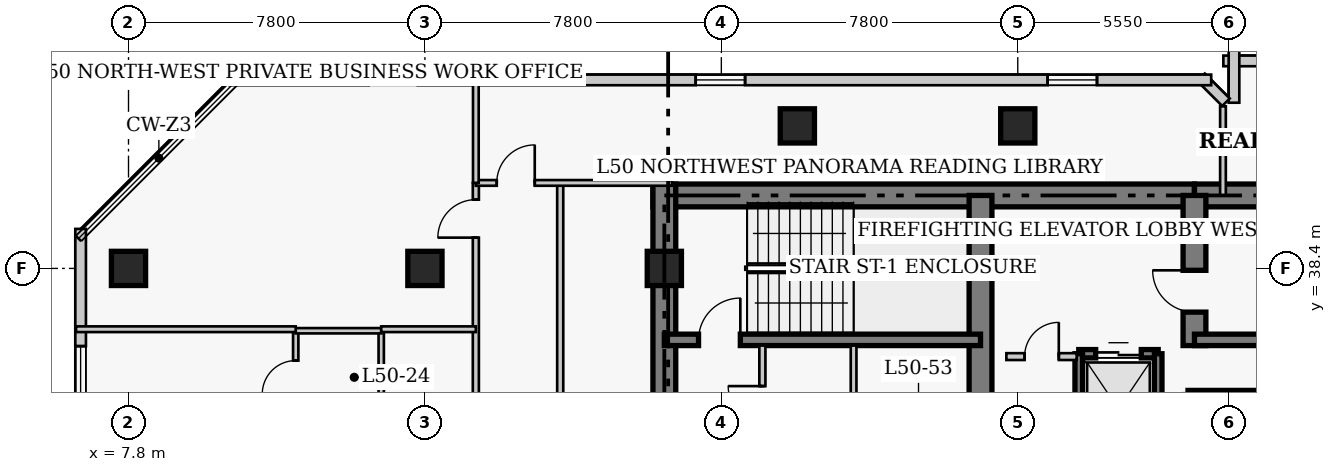
"""IFC4 building model, lengths in metres.
Left out: names, types, materials, properties, quantities, classifications, styles, units other than length and angle.
Written with IfcOpenShell. Run it as: python <this file> out.ifc"""

import sys

from ifc_helpers import new_model, si_unit, direction, frame, frame_2d, origin, origin_2d, place, context, subcontext, project, spatial, rectangle, extrude, element, fill, save


model = new_model("IFC4")
c1 = context("Model", 3, precision=1e-05, world=origin(), true_north=direction((0.0, 1.0)))
c2 = subcontext(c1, "Body", "Model", "MODEL_VIEW")
j1 = project(units=[si_unit("LENGTHUNIT", "METRE"), si_unit("PLANEANGLEUNIT", "RADIAN")], contexts=[c1])
p1 = place(None, origin())
s1 = spatial("IfcSite", under=j1, at=p1, CompositionType="ELEMENT")
p2 = place(p1, origin())
s2 = spatial("IfcBuilding", under=s1, at=p2, CompositionType="ELEMENT")
p3 = place(p2, frame((0.0, 0.0, 200.7)))
s3 = spatial("IfcBuildingStorey", under=s2, at=p3, CompositionType="ELEMENT", Elevation=200.7)
p4 = place(p3, frame((21.6, 40.32, 0.0), z_axis=(0.0, 0.0, 1.0), x_axis=(1.0, 0.0, 0.0)))
e1 = element("IfcWall", 1, at=p4, inside=s3, PredefinedType="SHEAR", context=c2, shape_type="SweptSolid", body=[
    extrude(rectangle(XDim=14.25, YDim=0.6, at=frame_2d((7.125, 0.0))), origin(), (0.0, 0.0, 1.0), 3.9),
])
p5 = place(p3, frame((35.85, 40.32, 0.0), z_axis=(0.0, 0.0, 1.0), x_axis=(1.0, 0.0, 0.0)))
e2 = element("IfcWall", 2, at=p5, inside=s3, PredefinedType="SHEAR", context=c2, shape_type="SweptSolid", body=[
    extrude(rectangle(XDim=12.6, YDim=0.6, at=frame_2d((6.3, 0.0))), origin(), (0.0, 0.0, 1.0), 3.9),
])
p6 = place(p3, frame((21.9, 27.05, 0.0), z_axis=(0.0, 0.0, 1.0), x_axis=(0.0, 1.0, 0.0)))
e3 = element("IfcWall", 3, at=p6, inside=s3, PredefinedType="SHEAR", context=c2, shape_type="SweptSolid", body=[
    extrude(rectangle(XDim=13.57, YDim=0.6, at=frame_2d((6.785, 0.0))), origin(), (0.0, 0.0, 1.0), 3.9),
])
p7 = place(p3, frame((30.22, 33.05, 0.0), z_axis=(0.0, 0.0, 1.0), x_axis=(0.0, 1.0, 0.0)))
e4 = element("IfcWall", 4, at=p7, inside=s3, PredefinedType="SHEAR", context=c2, shape_type="SweptSolid", body=[
    extrude(rectangle(XDim=7.27, YDim=0.6, at=frame_2d((3.635, 0.0))), origin(), (0.0, 0.0, 1.0), 3.9),
])
p8 = place(p3, frame((35.85, 36.37, 0.0), z_axis=(0.0, 0.0, 1.0), x_axis=(0.0, 1.0, 0.0)))
e5 = element("IfcWall", 5, at=p8, inside=s3, PredefinedType="SHEAR", context=c2, shape_type="SweptSolid", body=[
    extrude(rectangle(XDim=3.95, YDim=0.6, at=frame_2d((1.975, 0.0))), origin(), (0.0, 0.0, 1.0), 3.9),
])
p9 = place(p8, frame((0.88, 0.0, 0.0)))
e6 = element("IfcOpeningElement", 6, at=p9, cuts=e5, PredefinedType="OPENING", context=c2, shape_type="SweptSolid", body=[
    extrude(rectangle(XDim=1.1, YDim=2.15, at=frame_2d((0.55, 1.075))), frame((0.0, 0.31, 0.0), z_axis=(0.0, -1.0, 0.0), x_axis=(1.0, 0.0, 0.0)), (0.0, 0.0, 1.0), 0.62),
])
p10 = place(p3, frame((21.9, 36.52, 0.0), z_axis=(0.0, 0.0, 1.0), x_axis=(1.0, 0.0, 0.0)))
e7 = element("IfcWall", 7, at=p10, inside=s3, PredefinedType="SHEAR", context=c2, shape_type="SweptSolid", body=[
    extrude(rectangle(XDim=8.32, YDim=0.3, at=frame_2d((4.16, 0.0))), origin(), (0.0, 0.0, 1.0), 3.9),
])
p11 = place(p10, frame((0.9, 0.0, 0.0)))
e8 = element("IfcOpeningElement", 8, at=p11, cuts=e7, PredefinedType="OPENING", context=c2, shape_type="SweptSolid", body=[
    extrude(rectangle(XDim=1.1, YDim=2.15, at=frame_2d((0.55, 1.075))), frame((0.0, 0.16, 0.0), z_axis=(0.0, -1.0, 0.0), x_axis=(1.0, 0.0, 0.0)), (0.0, 0.0, 1.0), 0.32),
])
p12 = place(p3, frame((35.85, 36.52, 0.0), z_axis=(0.0, 0.0, 1.0), x_axis=(1.0, 0.0, 0.0)))
e9 = element("IfcWall", 9, at=p12, inside=s3, PredefinedType="SHEAR", context=c2, shape_type="SweptSolid", body=[
    extrude(rectangle(XDim=8.33, YDim=0.3, at=frame_2d((4.165, 0.0))), origin(), (0.0, 0.0, 1.0), 3.9),
])
for number, where, z_axis, x_axis in (
    (10, (7.8, 38.4, 0.0), (0.0, 0.0, 1.0), (1.0, 0.0, 0.0)),
    (11, (15.6, 38.4, 0.0), (0.0, 0.0, 1.0), (1.0, 0.0, 0.0)),
    (12, (21.9, 38.4, 0.0), (0.0, 0.0, 1.0), (1.0, 0.0, 0.0)),
    (13, (25.4, 42.15, 0.0), (0.0, 0.0, 1.0), (1.0, 0.0, 0.0)),
    (14, (31.2, 42.15, 0.0), (0.0, 0.0, 1.0), (1.0, 0.0, 0.0)),
):
    element("IfcColumn", number, at=place(p3, frame(where, z_axis=z_axis, x_axis=x_axis)), inside=s3, PredefinedType="COLUMN", context=c2, shape_type="SweptSolid", body=[
        extrude(rectangle(XDim=0.9, YDim=0.9, at=origin_2d()), origin(), (0.0, 0.0, 1.0), 3.9),
    ])
p13 = place(p3, frame((41.39, 43.86, 0.0), z_axis=(0.0, 0.0, 1.0), x_axis=(-1.0, 0.0, 0.0)))
e15 = element("IfcWall", 15, at=p13, inside=s3, PredefinedType="SOLIDWALL", context=c2, shape_type="SweptSolid", body=[
    extrude(rectangle(XDim=4.78, YDim=0.28, at=frame_2d((2.39, 0.0))), origin(), (0.0, 0.0, 1.0), 3.65),
])
p14 = place(p13, frame((1.74, 0.0, 0.85)))
e16 = element("IfcOpeningElement", 16, at=p14, cuts=e15, PredefinedType="OPENING", context=c2, shape_type="SweptSolid", body=[
    extrude(rectangle(XDim=1.3, YDim=1.7, at=frame_2d((0.65, 0.85))), frame((0.0, 0.15, 0.0), z_axis=(0.0, -1.0, 0.0), x_axis=(1.0, 0.0, 0.0)), (0.0, 0.0, 1.0), 0.3),
])
p15 = place(p3, frame((36.89, 44.14, 0.0), z_axis=(0.0, 0.0, 1.0), x_axis=(0.0, -1.0, 0.0)))
e17 = element("IfcWall", 17, at=p15, inside=s3, PredefinedType="SOLIDWALL", context=c2, shape_type="SweptSolid", body=[
    extrude(rectangle(XDim=1.38, YDim=0.28, at=frame_2d((0.69, 0.0))), origin(), (0.0, 0.0, 1.0), 3.65),
])
p16 = place(p3, frame((36.679, 42.773, 0.0), z_axis=(0.0, 0.0, 1.0), x_axis=(-0.707106781187, 0.707106781187, 0.0)))
e18 = element("IfcWall", 18, at=p16, inside=s3, PredefinedType="SOLIDWALL", context=c2, shape_type="SweptSolid", body=[
    extrude(rectangle(XDim=0.928, YDim=0.28, at=frame_2d((0.464, 0.0))), origin(), (0.0, 0.0, 1.0), 3.65),
])
p17 = place(p3, frame((36.29, 43.36, 0.0), z_axis=(0.0, 0.0, 1.0), x_axis=(-1.0, 0.0, 0.0)))
e19 = element("IfcWall", 19, at=p17, inside=s3, PredefinedType="SOLIDWALL", context=c2, shape_type="SweptSolid", body=[
    extrude(rectangle(XDim=25.83, YDim=0.28, at=frame_2d((12.915, 0.0))), origin(), (0.0, 0.0, 1.0), 3.65),
])
p18 = place(p17, frame((3.005, 0.0, 0.85)))
e20 = element("IfcOpeningElement", 20, at=p18, cuts=e19, PredefinedType="OPENING", context=c2, shape_type="SweptSolid", body=[
    extrude(rectangle(XDim=1.3, YDim=1.7, at=frame_2d((0.65, 0.85))), frame((0.0, 0.15, 0.0), z_axis=(0.0, -1.0, 0.0), x_axis=(1.0, 0.0, 0.0)), (0.0, 0.0, 1.0), 0.3),
])
p19 = place(p17, frame((12.265, 0.0, 0.85)))
e21 = element("IfcOpeningElement", 21, at=p19, cuts=e19, PredefinedType="OPENING", context=c2, shape_type="SweptSolid", body=[
    extrude(rectangle(XDim=1.3, YDim=1.7, at=frame_2d((0.65, 0.85))), frame((0.0, 0.15, 0.0), z_axis=(0.0, -1.0, 0.0), x_axis=(1.0, 0.0, 0.0)), (0.0, 0.0, 1.0), 0.3),
])
p20 = place(p17, frame((20.875, 0.0, 0.85)))
e22 = element("IfcOpeningElement", 22, at=p20, cuts=e19, PredefinedType="OPENING", context=c2, shape_type="SweptSolid", body=[
    extrude(rectangle(XDim=1.3, YDim=1.7, at=frame_2d((0.65, 0.85))), frame((0.0, 0.15, 0.0), z_axis=(0.0, -1.0, 0.0), x_axis=(1.0, 0.0, 0.0)), (0.0, 0.0, 1.0), 0.3),
])
p21 = place(p3, frame((6.54, 39.44, 0.0), z_axis=(0.0, 0.0, 1.0), x_axis=(0.0, -1.0, 0.0)))
e23 = element("IfcWall", 23, at=p21, inside=s3, PredefinedType="SOLIDWALL", context=c2, shape_type="SweptSolid", body=[
    extrude(rectangle(XDim=29.88, YDim=0.28, at=frame_2d((14.94, 0.0))), origin(), (0.0, 0.0, 1.0), 3.65),
])
p22 = place(p21, frame((3.085, 0.0, 0.85)))
e24 = element("IfcOpeningElement", 24, at=p22, cuts=e23, PredefinedType="OPENING", context=c2, shape_type="SweptSolid", body=[
    extrude(rectangle(XDim=1.3, YDim=1.7, at=frame_2d((0.65, 0.85))), frame((0.0, 0.15, 0.0), z_axis=(0.0, -1.0, 0.0), x_axis=(1.0, 0.0, 0.0)), (0.0, 0.0, 1.0), 0.3),
])
p23 = place(p21, frame((11.205, 0.0, 0.85)))
e25 = element("IfcOpeningElement", 25, at=p23, cuts=e23, PredefinedType="OPENING", context=c2, shape_type="SweptSolid", body=[
    extrude(rectangle(XDim=1.3, YDim=1.7, at=frame_2d((0.65, 0.85))), frame((0.0, 0.15, 0.0), z_axis=(0.0, -1.0, 0.0), x_axis=(1.0, 0.0, 0.0)), (0.0, 0.0, 1.0), 0.3),
])
p24 = place(p21, frame((17.375, 0.0, 0.85)))
e26 = element("IfcOpeningElement", 26, at=p24, cuts=e23, PredefinedType="OPENING", context=c2, shape_type="SweptSolid", body=[
    extrude(rectangle(XDim=1.3, YDim=1.7, at=frame_2d((0.65, 0.85))), frame((0.0, 0.15, 0.0), z_axis=(0.0, -1.0, 0.0), x_axis=(1.0, 0.0, 0.0)), (0.0, 0.0, 1.0), 0.3),
])
p25 = place(p21, frame((25.495, 0.0, 0.85)))
e27 = element("IfcOpeningElement", 27, at=p25, cuts=e23, PredefinedType="OPENING", context=c2, shape_type="SweptSolid", body=[
    extrude(rectangle(XDim=1.3, YDim=1.7, at=frame_2d((0.65, 0.85))), frame((0.0, 0.15, 0.0), z_axis=(0.0, -1.0, 0.0), x_axis=(1.0, 0.0, 0.0)), (0.0, 0.0, 1.0), 0.3),
])
p26 = place(p3, frame((35.68, 35.08, 0.0), z_axis=(0.0, 0.0, 1.0), x_axis=(1.0, 0.0, 0.0)))
e28 = element("IfcWall", 28, at=p26, inside=s3, PredefinedType="SHEAR", context=c2, shape_type="SweptSolid", body=[
    extrude(rectangle(XDim=2.32, YDim=0.22, at=frame_2d((1.16, 0.0))), origin(), (0.0, 0.0, 1.0), 3.9),
])
p27 = place(p3, frame((32.805, 36.155, 0.0), z_axis=(0.0, 0.0, 1.0), x_axis=(1.0, 0.0, 0.0)))
e29 = element("IfcWall", 29, at=p27, inside=s3, PredefinedType="SHEAR", context=c2, shape_type="SweptSolid", body=[
    extrude(rectangle(XDim=2.09, YDim=0.22, at=frame_2d((1.045, 0.0))), origin(), (0.0, 0.0, 1.0), 3.9),
])
p28 = place(p27, frame((0.445, 0.0, 0.0)))
e30 = element("IfcOpeningElement", 30, at=p28, cuts=e29, PredefinedType="OPENING", context=c2, shape_type="SweptSolid", body=[
    extrude(rectangle(XDim=1.2, YDim=2.15, at=frame_2d((0.6, 1.075))), frame((0.0, 0.12, 0.0), z_axis=(0.0, -1.0, 0.0), x_axis=(1.0, 0.0, 0.0)), (0.0, 0.0, 1.0), 0.24),
])
for number, where, z_axis, x_axis in (
    (31, (32.805, 33.245, 0.0), (0.0, 0.0, 1.0), (0.0, 1.0, 0.0)),
    (32, (34.895, 33.245, 0.0), (0.0, 0.0, 1.0), (0.0, 1.0, 0.0)),
):
    element("IfcWall", number, at=place(p3, frame(where, z_axis=z_axis, x_axis=x_axis)), inside=s3, PredefinedType="SHEAR", context=c2, shape_type="SweptSolid", body=[
        extrude(rectangle(XDim=2.91, YDim=0.2, at=frame_2d((1.455, 0.0))), origin(), (0.0, 0.0, 1.0), 3.9),
    ])
p29 = place(p3, frame((30.9, 36.08, 0.0), z_axis=(0.0, 0.0, 1.0), x_axis=(1.0, 0.0, 0.0)))
e33 = element("IfcWall", 33, at=p29, inside=s3, PredefinedType="PARTITIONING", context=c2, shape_type="SweptSolid", body=[
    extrude(rectangle(XDim=1.85, YDim=0.18, at=frame_2d((0.925, 0.0))), origin(), (0.0, 0.0, 1.0), 3.65),
])
p30 = place(p29, frame((0.48, 0.0, 0.0)))
e34 = element("IfcOpeningElement", 34, at=p30, cuts=e33, PredefinedType="OPENING", context=c2, shape_type="SweptSolid", body=[
    extrude(rectangle(XDim=0.9, YDim=2.15, at=frame_2d((0.45, 1.075))), frame((0.0, 0.1, 0.0), z_axis=(0.0, -1.0, 0.0), x_axis=(1.0, 0.0, 0.0)), (0.0, 0.0, 1.0), 0.2),
])
p31 = place(p3, frame((24.48, 32.8, 0.0), z_axis=(0.0, 0.0, 1.0), x_axis=(0.0, 1.0, 0.0)))
e35 = element("IfcWall", 35, at=p31, inside=s3, PredefinedType="PARTITIONING", context=c2, shape_type="SweptSolid", body=[
    extrude(rectangle(XDim=3.57, YDim=0.16, at=frame_2d((1.785, 0.0))), origin(), (0.0, 0.0, 1.0), 3.65),
])
p32 = place(p31, frame((1.604, 0.0, 0.0)))
e36 = element("IfcOpeningElement", 36, at=p32, cuts=e35, PredefinedType="OPENING", context=c2, shape_type="SweptSolid", body=[
    extrude(rectangle(XDim=0.9, YDim=2.1, at=frame_2d((0.45, 1.05))), frame((0.0, 0.09, 0.0), z_axis=(0.0, -1.0, 0.0), x_axis=(1.0, 0.0, 0.0)), (0.0, 0.0, 1.0), 0.18),
])
p33 = place(p3, frame((26.88, 32.75, 0.0), z_axis=(0.0, 0.0, 1.0), x_axis=(0.0, 1.0, 0.0)))
e37 = element("IfcWall", 37, at=p33, inside=s3, PredefinedType="PARTITIONING", context=c2, shape_type="SweptSolid", body=[
    extrude(rectangle(XDim=3.62, YDim=0.15, at=frame_2d((1.81, 0.0))), origin(), (0.0, 0.0, 1.0), 3.65),
])
p34 = place(p3, frame((16.94, 7.55, 0.0), z_axis=(0.0, 0.0, 1.0), x_axis=(0.0, 1.0, 0.0)))
e38 = element("IfcWall", 38, at=p34, inside=s3, PredefinedType="PARTITIONING", context=c2, shape_type="SweptSolid", body=[
    extrude(rectangle(XDim=33.1, YDim=0.16, at=frame_2d((16.55, 0.0))), origin(), (0.0, 0.0, 1.0), 3.65),
])
p35 = place(p34, frame((0.46, 0.0, 0.0)))
e39 = element("IfcOpeningElement", 39, at=p35, cuts=e38, PredefinedType="OPENING", context=c2, shape_type="SweptSolid", body=[
    extrude(rectangle(XDim=0.95, YDim=2.1, at=frame_2d((0.475, 1.05))), frame((0.0, 0.09, 0.0), z_axis=(0.0, -1.0, 0.0), x_axis=(1.0, 0.0, 0.0)), (0.0, 0.0, 1.0), 0.18),
])
p36 = place(p34, frame((7.575, 0.0, 0.0)))
e40 = element("IfcOpeningElement", 40, at=p36, cuts=e38, PredefinedType="OPENING", context=c2, shape_type="SweptSolid", body=[
    extrude(rectangle(XDim=0.95, YDim=2.1, at=frame_2d((0.475, 1.05))), frame((0.0, 0.09, 0.0), z_axis=(0.0, -1.0, 0.0), x_axis=(1.0, 0.0, 0.0)), (0.0, 0.0, 1.0), 0.18),
])
p37 = place(p34, frame((16.375, 0.0, 0.0)))
e41 = element("IfcOpeningElement", 41, at=p37, cuts=e38, PredefinedType="OPENING", context=c2, shape_type="SweptSolid", body=[
    extrude(rectangle(XDim=0.95, YDim=2.1, at=frame_2d((0.475, 1.05))), frame((0.0, 0.09, 0.0), z_axis=(0.0, -1.0, 0.0), x_axis=(1.0, 0.0, 0.0)), (0.0, 0.0, 1.0), 0.18),
])
p38 = place(p34, frame((24.775, 0.0, 0.0)))
e42 = element("IfcOpeningElement", 42, at=p38, cuts=e38, PredefinedType="OPENING", context=c2, shape_type="SweptSolid", body=[
    extrude(rectangle(XDim=0.95, YDim=2.1, at=frame_2d((0.475, 1.05))), frame((0.0, 0.09, 0.0), z_axis=(0.0, -1.0, 0.0), x_axis=(1.0, 0.0, 0.0)), (0.0, 0.0, 1.0), 0.18),
])
p39 = place(p34, frame((31.66, 0.0, 0.0)))
e43 = element("IfcOpeningElement", 43, at=p39, cuts=e38, PredefinedType="OPENING", context=c2, shape_type="SweptSolid", body=[
    extrude(rectangle(XDim=1.0, YDim=2.15, at=frame_2d((0.5, 1.075))), frame((0.0, 0.09, 0.0), z_axis=(0.0, -1.0, 0.0), x_axis=(1.0, 0.0, 0.0)), (0.0, 0.0, 1.0), 0.18),
])
p40 = place(p3, frame((19.16, 35.02, 0.0), z_axis=(0.0, 0.0, 1.0), x_axis=(0.0, 1.0, 0.0)))
e44 = element("IfcWall", 44, at=p40, inside=s3, PredefinedType="PARTITIONING", context=c2, shape_type="SweptSolid", body=[
    extrude(rectangle(XDim=5.63, YDim=0.16, at=frame_2d((2.815, 0.0))), origin(), (0.0, 0.0, 1.0), 3.65),
])
p41 = place(p3, frame((16.94, 40.65, 0.0), z_axis=(0.0, 0.0, 1.0), x_axis=(1.0, 0.0, 0.0)))
e45 = element("IfcWall", 45, at=p41, inside=s3, PredefinedType="PARTITIONING", context=c2, shape_type="SweptSolid", body=[
    extrude(rectangle(XDim=5.16, YDim=0.15, at=frame_2d((2.58, 0.0))), origin(), (0.0, 0.0, 1.0), 3.65),
])
p42 = place(p41, frame((0.55, 0.0, 0.0)))
e46 = element("IfcOpeningElement", 46, at=p42, cuts=e45, PredefinedType="OPENING", context=c2, shape_type="SweptSolid", body=[
    extrude(rectangle(XDim=1.0, YDim=2.15, at=frame_2d((0.5, 1.075))), frame((0.0, 0.085, 0.0), z_axis=(0.0, -1.0, 0.0), x_axis=(1.0, 0.0, 0.0)), (0.0, 0.0, 1.0), 0.17),
])
p43 = place(p3, frame((16.94, 40.65, 0.0), z_axis=(0.0, 0.0, 1.0), x_axis=(0.0, 1.0, 0.0)))
e47 = element("IfcWall", 47, at=p43, inside=s3, PredefinedType="PARTITIONING", context=c2, shape_type="SweptSolid", body=[
    extrude(rectangle(XDim=2.83, YDim=0.15, at=frame_2d((1.415, 0.0))), origin(), (0.0, 0.0, 1.0), 3.65),
])
p44 = place(p3, frame((36.6, 40.32, 0.0), z_axis=(0.0, 0.0, 1.0), x_axis=(0.0, 1.0, 0.0)))
e48 = element("IfcWall", 48, at=p44, inside=s3, PredefinedType="PARTITIONING", context=c2, shape_type="SweptSolid", body=[
    extrude(rectangle(XDim=2.345, YDim=0.15, at=frame_2d((1.172, 0.0))), origin(), (0.0, 0.0, 1.0), 3.65),
])
p45 = place(p3, frame((12.2, 34.31, 0.0), z_axis=(0.0, 0.0, 1.0), x_axis=(0.0, 1.0, 0.0)))
e49 = element("IfcWall", 49, at=p45, inside=s3, PredefinedType="PLUMBINGWALL", context=c2, shape_type="SweptSolid", body=[
    extrude(rectangle(XDim=2.45, YDim=0.14, at=frame_2d((1.225, 0.0))), origin(), (0.0, 0.0, 1.0), 3.65),
])
p46 = place(p45, frame((0.785, 0.0, 0.0)))
e50 = element("IfcOpeningElement", 50, at=p46, cuts=e49, PredefinedType="OPENING", context=c2, shape_type="SweptSolid", body=[
    extrude(rectangle(XDim=0.88, YDim=2.05, at=frame_2d((0.44, 1.025))), frame((0.0, 0.08, 0.0), z_axis=(0.0, -1.0, 0.0), x_axis=(1.0, 0.0, 0.0)), (0.0, 0.0, 1.0), 0.16),
])
p47 = place(p3, frame((14.45, 34.31, 0.0), z_axis=(0.0, 0.0, 1.0), x_axis=(0.0, 1.0, 0.0)))
e51 = element("IfcWall", 51, at=p47, inside=s3, PredefinedType="PLUMBINGWALL", context=c2, shape_type="SweptSolid", body=[
    extrude(rectangle(XDim=2.45, YDim=0.14, at=frame_2d((1.225, 0.0))), origin(), (0.0, 0.0, 1.0), 3.65),
])
p48 = place(p3, frame((12.2, 36.76, 0.0), z_axis=(0.0, 0.0, 1.0), x_axis=(1.0, 0.0, 0.0)))
e52 = element("IfcWall", 52, at=p48, inside=s3, PredefinedType="PLUMBINGWALL", context=c2, shape_type="SweptSolid", body=[
    extrude(rectangle(XDim=2.25, YDim=0.14, at=frame_2d((1.125, 0.0))), origin(), (0.0, 0.0, 1.0), 3.65),
])
p49 = place(p3, frame((6.42, 36.8, 0.0), z_axis=(0.0, 0.0, 1.0), x_axis=(1.0, 0.0, 0.0)))
e53 = element("IfcWall", 53, at=p49, inside=s3, PredefinedType="PARTITIONING", context=c2, shape_type="SweptSolid", body=[
    extrude(rectangle(XDim=5.78, YDim=0.15, at=frame_2d((2.89, 0.0))), origin(), (0.0, 0.0, 1.0), 3.65),
])
p50 = place(p3, frame((14.45, 36.8, 0.0), z_axis=(0.0, 0.0, 1.0), x_axis=(1.0, 0.0, 0.0)))
e54 = element("IfcWall", 54, at=p50, inside=s3, PredefinedType="PARTITIONING", context=c2, shape_type="SweptSolid", body=[
    extrude(rectangle(XDim=2.49, YDim=0.15, at=frame_2d((1.245, 0.0))), origin(), (0.0, 0.0, 1.0), 3.65),
])
p51 = place(p18, origin())
e55 = element("IfcWindow", 55, at=p51, inside=s3, PartitioningType="SINGLE_PANEL", PredefinedType="WINDOW", context=c2, shape_type="SweptSolid", body=[
    extrude(rectangle(XDim=1.3, YDim=1.7, at=frame_2d((0.65, 0.85))), frame((0.0, 0.03, 0.0), z_axis=(0.0, -1.0, 0.0), x_axis=(1.0, 0.0, 0.0)), (0.0, 0.0, 1.0), 0.06),
])
fill(e20, e55)
p52 = place(p19, origin())
e56 = element("IfcWindow", 56, at=p52, inside=s3, PartitioningType="SINGLE_PANEL", PredefinedType="WINDOW", context=c2, shape_type="SweptSolid", body=[
    extrude(rectangle(XDim=1.3, YDim=1.7, at=frame_2d((0.65, 0.85))), frame((0.0, 0.03, 0.0), z_axis=(0.0, -1.0, 0.0), x_axis=(1.0, 0.0, 0.0)), (0.0, 0.0, 1.0), 0.06),
])
fill(e21, e56)
p53 = place(p20, origin())
e57 = element("IfcWindow", 57, at=p53, inside=s3, PartitioningType="SINGLE_PANEL", PredefinedType="WINDOW", context=c2, shape_type="SweptSolid", body=[
    extrude(rectangle(XDim=1.3, YDim=1.7, at=frame_2d((0.65, 0.85))), frame((0.0, 0.03, 0.0), z_axis=(0.0, -1.0, 0.0), x_axis=(1.0, 0.0, 0.0)), (0.0, 0.0, 1.0), 0.06),
])
fill(e22, e57)
p54 = place(p22, origin())
e58 = element("IfcWindow", 58, at=p54, inside=s3, PartitioningType="SINGLE_PANEL", PredefinedType="WINDOW", context=c2, shape_type="SweptSolid", body=[
    extrude(rectangle(XDim=1.3, YDim=1.7, at=frame_2d((0.65, 0.85))), frame((0.0, 0.03, 0.0), z_axis=(0.0, -1.0, 0.0), x_axis=(1.0, 0.0, 0.0)), (0.0, 0.0, 1.0), 0.06),
])
fill(e24, e58)
p55 = place(p28, origin())
e59 = element("IfcDoor", 59, at=p55, inside=s3, OperationType="DOUBLE_DOOR_SLIDING", PredefinedType="DOOR", context=c2, shape_type="SweptSolid", body=[
    extrude(rectangle(XDim=1.2, YDim=2.15, at=frame_2d((0.6, 1.075))), frame((0.0, 0.025, 0.0), z_axis=(0.0, -1.0, 0.0), x_axis=(1.0, 0.0, 0.0)), (0.0, 0.0, 1.0), 0.05),
])
fill(e30, e59)
p56 = place(p30, origin())
e60 = element("IfcDoor", 60, at=p56, inside=s3, OperationType="SINGLE_SWING_RIGHT", PredefinedType="DOOR", context=c2, shape_type="SweptSolid", body=[
    extrude(rectangle(XDim=0.9, YDim=2.15, at=frame_2d((0.45, 1.075))), frame((0.0, 0.025, 0.0), z_axis=(0.0, -1.0, 0.0), x_axis=(1.0, 0.0, 0.0)), (0.0, 0.0, 1.0), 0.05),
])
fill(e34, e60)
p57 = place(p32, origin())
e61 = element("IfcDoor", 61, at=p57, inside=s3, OperationType="SINGLE_SWING_RIGHT", PredefinedType="DOOR", context=c2, shape_type="SweptSolid", body=[
    extrude(rectangle(XDim=0.9, YDim=2.1, at=frame_2d((0.45, 1.05))), frame((0.0, 0.025, 0.0), z_axis=(0.0, -1.0, 0.0), x_axis=(1.0, 0.0, 0.0)), (0.0, 0.0, 1.0), 0.05),
])
fill(e36, e61)
p58 = place(p42, origin())
e62 = element("IfcDoor", 62, at=p58, inside=s3, OperationType="SINGLE_SWING_RIGHT", PredefinedType="DOOR", context=c2, shape_type="SweptSolid", body=[
    extrude(rectangle(XDim=1.0, YDim=2.15, at=frame_2d((0.5, 1.075))), frame((0.0, 0.025, 0.0), z_axis=(0.0, -1.0, 0.0), x_axis=(1.0, 0.0, 0.0)), (0.0, 0.0, 1.0), 0.05),
])
fill(e46, e62)
p59 = place(p46, origin())
e63 = element("IfcDoor", 63, at=p59, inside=s3, OperationType="SINGLE_SWING_LEFT", PredefinedType="DOOR", context=c2, shape_type="SweptSolid", body=[
    extrude(rectangle(XDim=0.88, YDim=2.05, at=frame_2d((0.44, 1.025))), frame((0.0, 0.025, 0.0), z_axis=(0.0, -1.0, 0.0), x_axis=(1.0, 0.0, 0.0)), (0.0, 0.0, 1.0), 0.05),
])
fill(e50, e63)
p60 = place(p39, origin())
e64 = element("IfcDoor", 64, at=p60, inside=s3, OperationType="SINGLE_SWING_LEFT", PredefinedType="DOOR", context=c2, shape_type="SweptSolid", body=[
    extrude(rectangle(XDim=1.0, YDim=2.15, at=frame_2d((0.5, 1.075))), frame((0.0, 0.025, 0.0), z_axis=(0.0, -1.0, 0.0), x_axis=(1.0, 0.0, 0.0)), (0.0, 0.0, 1.0), 0.05),
])
fill(e43, e64)
p61 = place(p11, origin())
e65 = element("IfcDoor", 65, at=p61, inside=s3, OperationType="SINGLE_SWING_RIGHT", PredefinedType="DOOR", context=c2, shape_type="SweptSolid", body=[
    extrude(rectangle(XDim=1.1, YDim=2.15, at=frame_2d((0.55, 1.075))), frame((0.0, 0.025, 0.0), z_axis=(0.0, -1.0, 0.0), x_axis=(1.0, 0.0, 0.0)), (0.0, 0.0, 1.0), 0.05),
])
fill(e8, e65)
p62 = place(p9, origin())
e66 = element("IfcDoor", 66, at=p62, inside=s3, OperationType="SINGLE_SWING_RIGHT", PredefinedType="DOOR", context=c2, shape_type="SweptSolid", body=[
    extrude(rectangle(XDim=1.1, YDim=2.15, at=frame_2d((0.55, 1.075))), frame((0.0, 0.025, 0.0), z_axis=(0.0, -1.0, 0.0), x_axis=(1.0, 0.0, 0.0)), (0.0, 0.0, 1.0), 0.05),
])
fill(e6, e66)
save(model, sys.argv[1])
